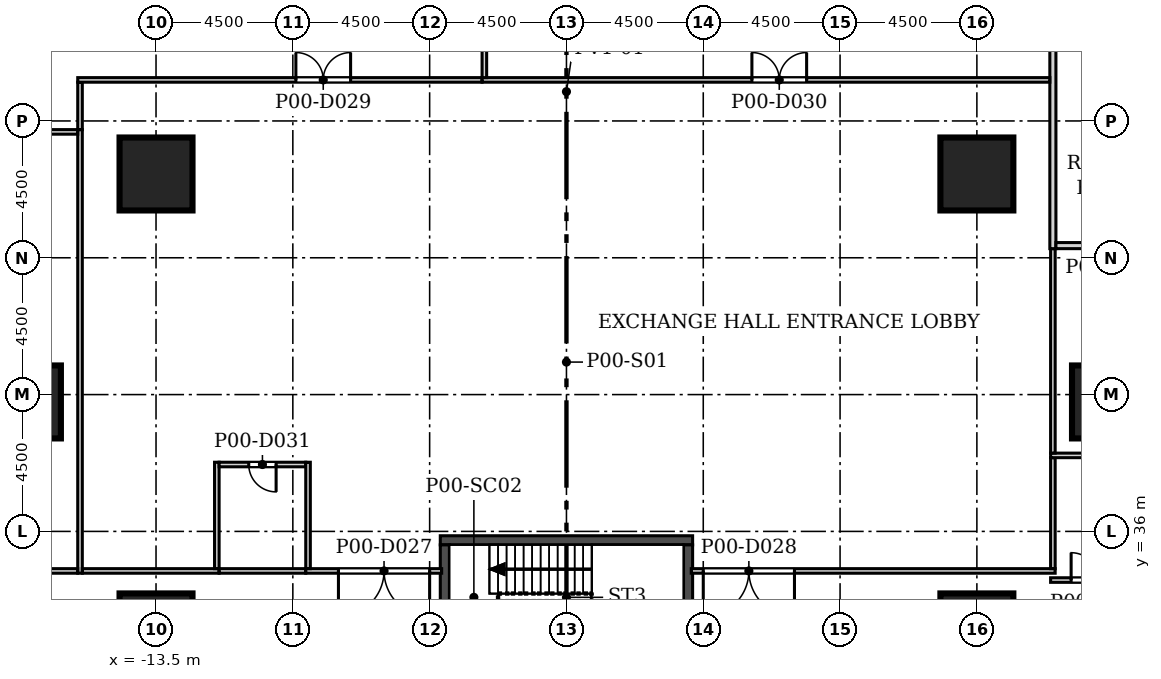
"""IFC4 building model, lengths in metres.
Left out: names, types, materials, properties, quantities, classifications, styles, units other than length and angle.
Written with IfcOpenShell. Run it as: python <this file> out.ifc"""

import sys

from ifc_helpers import new_model, si_unit, direction, frame, frame_2d, origin, origin_2d, place, context, subcontext, project, spatial, rectangle, extrude, element, fill, save


model = new_model("IFC4")
c1 = context("Model", 3, precision=1e-05, world=origin(), true_north=direction((0.0, 1.0)))
c2 = subcontext(c1, "Body", "Model", "MODEL_VIEW")
j1 = project(units=[si_unit("LENGTHUNIT", "METRE"), si_unit("PLANEANGLEUNIT", "RADIAN")], contexts=[c1])
p1 = place(None, origin())
s1 = spatial("IfcSite", under=j1, at=p1, CompositionType="ELEMENT")
p2 = place(p1, origin())
s2 = spatial("IfcBuilding", under=s1, at=p2, CompositionType="ELEMENT")
p3 = place(p2, origin())
s3 = spatial("IfcBuildingStorey", under=s2, at=p3, CompositionType="ELEMENT", Elevation=0.0)
for number, where, z_axis, x_axis in (
    (1, (-13.5, 47.756, 0.0), (0.0, 0.0, 1.0), (1.0, 0.0, 0.0)),
    (2, (-13.5, 32.76, 0.0), (0.0, 0.0, 1.0), (1.0, 0.0, 0.0)),
    (3, (13.5, 47.756, 0.0), (0.0, 0.0, 1.0), (1.0, 0.0, 0.0)),
    (4, (13.5, 32.76, 0.0), (0.0, 0.0, 1.0), (1.0, 0.0, 0.0)),
    (5, (17.829, 40.258, 0.0), (0.0, 0.0, 1.0), (1.0, 0.0, 0.0)),
    (6, (-17.829, 40.258, 0.0), (0.0, 0.0, 1.0), (1.0, 0.0, 0.0)),
):
    element("IfcColumn", number, at=place(p3, frame(where, z_axis=z_axis, x_axis=x_axis)), inside=s3, PredefinedType="COLUMN", context=c2, shape_type="SweptSolid", body=[
        extrude(rectangle(XDim=2.4, YDim=2.4, at=origin_2d()), origin(), (0.0, 0.0, 1.0), 8.0),
    ])
p4 = place(p3, frame((33.882, 24.114, 0.0), z_axis=(0.0, 0.0, 1.0), x_axis=(-0.500002868947, 0.866023747391, 0.0)))
e7 = element("IfcWall", 7, at=p4, inside=s3, PredefinedType="SOLIDWALL", context=c2, shape_type="SweptSolid", body=[
    extrude(rectangle(XDim=34.115, YDim=0.34, at=frame_2d((17.058, 0.0))), origin(), (0.0, 0.0, 1.0), 7.7),
])
p5 = place(p4, frame((1.115, 0.0, 0.9)))
e8 = element("IfcOpeningElement", 8, at=p5, cuts=e7, PredefinedType="OPENING", context=c2, shape_type="SweptSolid", body=[
    extrude(rectangle(XDim=1.885, YDim=3.5, at=frame_2d((0.942, 1.75))), frame((0.0, 0.18, 0.0), z_axis=(0.0, -1.0, 0.0), x_axis=(1.0, 0.0, 0.0)), (0.0, 0.0, 1.0), 0.36),
])
p6 = place(p4, frame((4.115, 0.0, 0.9)))
e9 = element("IfcOpeningElement", 9, at=p6, cuts=e7, PredefinedType="OPENING", context=c2, shape_type="SweptSolid", body=[
    extrude(rectangle(XDim=1.885, YDim=3.5, at=frame_2d((0.942, 1.75))), frame((0.0, 0.18, 0.0), z_axis=(0.0, -1.0, 0.0), x_axis=(1.0, 0.0, 0.0)), (0.0, 0.0, 1.0), 0.36),
])
p7 = place(p4, frame((22.115, 0.0, 0.9)))
e10 = element("IfcOpeningElement", 10, at=p7, cuts=e7, PredefinedType="OPENING", context=c2, shape_type="SweptSolid", body=[
    extrude(rectangle(XDim=1.885, YDim=3.5, at=frame_2d((0.942, 1.75))), frame((0.0, 0.18, 0.0), z_axis=(0.0, -1.0, 0.0), x_axis=(1.0, 0.0, 0.0)), (0.0, 0.0, 1.0), 0.36),
])
p8 = place(p4, frame((25.115, 0.0, 0.9)))
e11 = element("IfcOpeningElement", 11, at=p8, cuts=e7, PredefinedType="OPENING", context=c2, shape_type="SweptSolid", body=[
    extrude(rectangle(XDim=1.885, YDim=3.5, at=frame_2d((0.942, 1.75))), frame((0.0, 0.18, 0.0), z_axis=(0.0, -1.0, 0.0), x_axis=(1.0, 0.0, 0.0)), (0.0, 0.0, 1.0), 0.36),
])
p9 = place(p4, frame((7.378, 0.0, 0.0)))
e12 = element("IfcOpeningElement", 12, at=p9, cuts=e7, PredefinedType="OPENING", context=c2, shape_type="SweptSolid", body=[
    extrude(rectangle(XDim=2.4, YDim=2.7, at=frame_2d((1.2, 1.35))), frame((0.0, 0.18, 0.0), z_axis=(0.0, -1.0, 0.0), x_axis=(1.0, 0.0, 0.0)), (0.0, 0.0, 1.0), 0.36),
])
p10 = place(p4, frame((18.857, 0.0, 0.0)))
e13 = element("IfcOpeningElement", 13, at=p10, cuts=e7, PredefinedType="OPENING", context=c2, shape_type="SweptSolid", body=[
    extrude(rectangle(XDim=2.4, YDim=2.7, at=frame_2d((1.2, 1.35))), frame((0.0, 0.18, 0.0), z_axis=(0.0, -1.0, 0.0), x_axis=(1.0, 0.0, 0.0)), (0.0, 0.0, 1.0), 0.36),
])
p11 = place(p4, frame((30.336, 0.0, 0.0)))
e14 = element("IfcOpeningElement", 14, at=p11, cuts=e7, PredefinedType="OPENING", context=c2, shape_type="SweptSolid", body=[
    extrude(rectangle(XDim=2.4, YDim=2.7, at=frame_2d((1.2, 1.35))), frame((0.0, 0.18, 0.0), z_axis=(0.0, -1.0, 0.0), x_axis=(1.0, 0.0, 0.0)), (0.0, 0.0, 1.0), 0.36),
])
p12 = place(p4, frame((12.215, 0.0, 0.0)))
e15 = element("IfcOpeningElement", 15, at=p12, cuts=e7, PredefinedType="OPENING", context=c2, shape_type="SweptSolid", body=[
    extrude(rectangle(XDim=4.885, YDim=4.5, at=frame_2d((2.442, 2.25))), frame((0.0, 0.18, 0.0), z_axis=(0.0, -1.0, 0.0), x_axis=(1.0, 0.0, 0.0)), (0.0, 0.0, 1.0), 0.36),
])
p13 = place(p3, frame((-4.853, 74.393, 0.0), z_axis=(0.0, 0.0, 1.0), x_axis=(-0.499999725439, -0.866025562302, 0.0)))
e16 = element("IfcWall", 16, at=p13, inside=s3, PredefinedType="SOLIDWALL", context=c2, shape_type="SweptSolid", body=[
    extrude(rectangle(XDim=52.058, YDim=0.34, at=frame_2d((26.029, 0.0))), origin(), (0.0, 0.0, 1.0), 7.7),
])
p14 = place(p13, frame((19.058, 0.0, 0.9)))
e17 = element("IfcOpeningElement", 17, at=p14, cuts=e16, PredefinedType="OPENING", context=c2, shape_type="SweptSolid", body=[
    extrude(rectangle(XDim=1.885, YDim=3.5, at=frame_2d((0.942, 1.75))), frame((0.0, 0.18, 0.0), z_axis=(0.0, -1.0, 0.0), x_axis=(1.0, 0.0, 0.0)), (0.0, 0.0, 1.0), 0.36),
])
p15 = place(p13, frame((22.058, 0.0, 0.9)))
e18 = element("IfcOpeningElement", 18, at=p15, cuts=e16, PredefinedType="OPENING", context=c2, shape_type="SweptSolid", body=[
    extrude(rectangle(XDim=1.885, YDim=3.5, at=frame_2d((0.942, 1.75))), frame((0.0, 0.18, 0.0), z_axis=(0.0, -1.0, 0.0), x_axis=(1.0, 0.0, 0.0)), (0.0, 0.0, 1.0), 0.36),
])
p16 = place(p13, frame((40.058, 0.0, 0.9)))
e19 = element("IfcOpeningElement", 19, at=p16, cuts=e16, PredefinedType="OPENING", context=c2, shape_type="SweptSolid", body=[
    extrude(rectangle(XDim=1.885, YDim=3.5, at=frame_2d((0.942, 1.75))), frame((0.0, 0.18, 0.0), z_axis=(0.0, -1.0, 0.0), x_axis=(1.0, 0.0, 0.0)), (0.0, 0.0, 1.0), 0.36),
])
p17 = place(p13, frame((43.058, 0.0, 0.9)))
e20 = element("IfcOpeningElement", 20, at=p17, cuts=e16, PredefinedType="OPENING", context=c2, shape_type="SweptSolid", body=[
    extrude(rectangle(XDim=1.885, YDim=3.5, at=frame_2d((0.942, 1.75))), frame((0.0, 0.18, 0.0), z_axis=(0.0, -1.0, 0.0), x_axis=(1.0, 0.0, 0.0)), (0.0, 0.0, 1.0), 0.36),
])
p18 = place(p13, frame((48.279, 0.0, 0.0)))
e21 = element("IfcOpeningElement", 21, at=p18, cuts=e16, PredefinedType="OPENING", context=c2, shape_type="SweptSolid", body=[
    extrude(rectangle(XDim=2.4, YDim=2.7, at=frame_2d((1.2, 1.35))), frame((0.0, 0.18, 0.0), z_axis=(0.0, -1.0, 0.0), x_axis=(1.0, 0.0, 0.0)), (0.0, 0.0, 1.0), 0.36),
])
p19 = place(p13, frame((36.8, 0.0, 0.0)))
e22 = element("IfcOpeningElement", 22, at=p19, cuts=e16, PredefinedType="OPENING", context=c2, shape_type="SweptSolid", body=[
    extrude(rectangle(XDim=2.4, YDim=2.7, at=frame_2d((1.2, 1.35))), frame((0.0, 0.18, 0.0), z_axis=(0.0, -1.0, 0.0), x_axis=(1.0, 0.0, 0.0)), (0.0, 0.0, 1.0), 0.36),
])
p20 = place(p13, frame((31.06, 0.0, 0.0)))
e23 = element("IfcOpeningElement", 23, at=p20, cuts=e16, PredefinedType="OPENING", context=c2, shape_type="SweptSolid", body=[
    extrude(rectangle(XDim=2.4, YDim=2.7, at=frame_2d((1.2, 1.35))), frame((0.0, 0.18, 0.0), z_axis=(0.0, -1.0, 0.0), x_axis=(1.0, 0.0, 0.0)), (0.0, 0.0, 1.0), 0.36),
])
p21 = place(p13, frame((25.321, 0.0, 0.0)))
e24 = element("IfcOpeningElement", 24, at=p21, cuts=e16, PredefinedType="OPENING", context=c2, shape_type="SweptSolid", body=[
    extrude(rectangle(XDim=2.4, YDim=2.7, at=frame_2d((1.2, 1.35))), frame((0.0, 0.18, 0.0), z_axis=(0.0, -1.0, 0.0), x_axis=(1.0, 0.0, 0.0)), (0.0, 0.0, 1.0), 0.36),
])
p22 = place(p13, frame((13.842, 0.0, 0.0)))
e25 = element("IfcOpeningElement", 25, at=p22, cuts=e16, PredefinedType="OPENING", context=c2, shape_type="SweptSolid", body=[
    extrude(rectangle(XDim=2.4, YDim=2.7, at=frame_2d((1.2, 1.35))), frame((0.0, 0.18, 0.0), z_axis=(0.0, -1.0, 0.0), x_axis=(1.0, 0.0, 0.0)), (0.0, 0.0, 1.0), 0.36),
])
p23 = place(p13, frame((8.102, 0.0, 0.0)))
e26 = element("IfcOpeningElement", 26, at=p23, cuts=e16, PredefinedType="OPENING", context=c2, shape_type="SweptSolid", body=[
    extrude(rectangle(XDim=2.4, YDim=2.7, at=frame_2d((1.2, 1.35))), frame((0.0, 0.18, 0.0), z_axis=(0.0, -1.0, 0.0), x_axis=(1.0, 0.0, 0.0)), (0.0, 0.0, 1.0), 0.36),
])
p24 = place(p13, frame((2.363, 0.0, 0.0)))
e27 = element("IfcOpeningElement", 27, at=p24, cuts=e16, PredefinedType="OPENING", context=c2, shape_type="SweptSolid", body=[
    extrude(rectangle(XDim=2.4, YDim=2.7, at=frame_2d((1.2, 1.35))), frame((0.0, 0.18, 0.0), z_axis=(0.0, -1.0, 0.0), x_axis=(1.0, 0.0, 0.0)), (0.0, 0.0, 1.0), 0.36),
])
p25 = place(p3, frame((-4.15, 35.707, -0.4), z_axis=(0.0, 0.0, 1.0), x_axis=(1.0, 0.0, 0.0)))
e28 = element("IfcWall", 28, at=p25, inside=s3, PredefinedType="SOLIDWALL", context=c2, shape_type="SweptSolid", body=[
    extrude(rectangle(XDim=8.3, YDim=0.3, at=frame_2d((4.15, 0.0))), origin(), (0.0, 0.0, 1.0), 8.1),
])
for number, where, z_axis, x_axis in (
    (29, (-4.0, 29.057, -0.4), (0.0, 0.0, 1.0), (0.0, 1.0, 0.0)),
    (30, (4.0, 29.057, -0.4), (0.0, 0.0, 1.0), (0.0, 1.0, 0.0)),
):
    element("IfcWall", number, at=place(p3, frame(where, z_axis=z_axis, x_axis=x_axis)), inside=s3, PredefinedType="SOLIDWALL", context=c2, shape_type="SweptSolid", body=[
        extrude(rectangle(XDim=6.5, YDim=0.3, at=frame_2d((3.25, 0.0))), origin(), (0.0, 0.0, 1.0), 8.1),
    ])
p26 = place(p3, frame((26.075, 34.4, 0.0), z_axis=(0.0, 0.0, 1.0), x_axis=(-1.0, 0.0, 0.0)))
e31 = element("IfcWall", 31, at=p26, inside=s3, PredefinedType="PARTITIONING", context=c2, shape_type="SweptSolid", body=[
    extrude(rectangle(XDim=10.15, YDim=0.15, at=frame_2d((5.075, 0.0))), origin(), (0.0, 0.0, 1.0), 7.7),
])
p27 = place(p26, frame((7.675, 0.0, 0.0)))
e32 = element("IfcOpeningElement", 32, at=p27, cuts=e31, PredefinedType="OPENING", context=c2, shape_type="SweptSolid", body=[
    extrude(rectangle(XDim=1.8, YDim=2.1, at=frame_2d((0.9, 1.05))), frame((0.0, 0.085, 0.0), z_axis=(0.0, -1.0, 0.0), x_axis=(1.0, 0.0, 0.0)), (0.0, 0.0, 1.0), 0.17),
])
p28 = place(p3, frame((-16.0, 34.625, 0.0), z_axis=(0.0, 0.0, 1.0), x_axis=(0.0, 1.0, 0.0)))
e33 = element("IfcWall", 33, at=p28, inside=s3, PredefinedType="PARTITIONING", context=c2, shape_type="SweptSolid", body=[
    extrude(rectangle(XDim=14.59, YDim=0.15, at=frame_2d((7.295, 0.0))), origin(), (0.0, 0.0, 1.0), 7.7),
])
p29 = place(p3, frame((-16.075, 34.7, 0.0), z_axis=(0.0, 0.0, 1.0), x_axis=(-1.0, 0.0, 0.0)))
e34 = element("IfcWall", 34, at=p29, inside=s3, PredefinedType="PARTITIONING", context=c2, shape_type="SweptSolid", body=[
    extrude(rectangle(XDim=10.1, YDim=0.15, at=frame_2d((5.05, 0.0))), origin(), (0.0, 0.0, 1.0), 7.7),
])
p30 = place(p29, frame((3.025, 0.0, 0.0)))
e35 = element("IfcOpeningElement", 35, at=p30, cuts=e34, PredefinedType="OPENING", context=c2, shape_type="SweptSolid", body=[
    extrude(rectangle(XDim=1.8, YDim=2.1, at=frame_2d((0.9, 1.05))), frame((0.0, 0.085, 0.0), z_axis=(0.0, -1.0, 0.0), x_axis=(1.0, 0.0, 0.0)), (0.0, 0.0, 1.0), 0.17),
])
p31 = place(p3, frame((-11.425, 34.7, 0.0), z_axis=(0.0, 0.0, 1.0), x_axis=(-1.0, 0.0, 0.0)))
e36 = element("IfcWall", 36, at=p31, inside=s3, PredefinedType="PARTITIONING", context=c2, shape_type="SweptSolid", body=[
    extrude(rectangle(XDim=4.5, YDim=0.15, at=frame_2d((2.25, 0.0))), origin(), (0.0, 0.0, 1.0), 7.7),
])
p32 = place(p3, frame((-8.575, 34.7, 0.0), z_axis=(0.0, 0.0, 1.0), x_axis=(-1.0, 0.0, 0.0)))
e37 = element("IfcWall", 37, at=p32, inside=s3, PredefinedType="PARTITIONING", context=c2, shape_type="SweptSolid", body=[
    extrude(rectangle(XDim=2.85, YDim=0.15, at=frame_2d((1.425, 0.0))), origin(), (0.0, 0.0, 1.0), 7.7),
])
p33 = place(p3, frame((-4.105, 34.7, 0.0), z_axis=(0.0, 0.0, 1.0), x_axis=(-1.0, 0.0, 0.0)))
e38 = element("IfcWall", 38, at=p33, inside=s3, PredefinedType="PARTITIONING", context=c2, shape_type="SweptSolid", body=[
    extrude(rectangle(XDim=4.47, YDim=0.15, at=frame_2d((2.235, 0.0))), origin(), (0.0, 0.0, 1.0), 7.7),
])
p34 = place(p33, frame((0.395, 0.0, 0.0)))
e39 = element("IfcOpeningElement", 39, at=p34, cuts=e38, PredefinedType="OPENING", context=c2, shape_type="SweptSolid", body=[
    extrude(rectangle(XDim=3.0, YDim=2.4, at=frame_2d((1.5, 1.2))), frame((0.0, 0.085, 0.0), z_axis=(0.0, -1.0, 0.0), x_axis=(1.0, 0.0, 0.0)), (0.0, 0.0, 1.0), 0.17),
])
p35 = place(p3, frame((16.075, 34.7, 0.0), z_axis=(0.0, 0.0, 1.0), x_axis=(-1.0, 0.0, 0.0)))
e40 = element("IfcWall", 40, at=p35, inside=s3, PredefinedType="PARTITIONING", context=c2, shape_type="SweptSolid", body=[
    extrude(rectangle(XDim=11.97, YDim=0.15, at=frame_2d((5.985, 0.0))), origin(), (0.0, 0.0, 1.0), 7.7),
])
p36 = place(p35, frame((8.575, 0.0, 0.0)))
e41 = element("IfcOpeningElement", 41, at=p36, cuts=e40, PredefinedType="OPENING", context=c2, shape_type="SweptSolid", body=[
    extrude(rectangle(XDim=3.0, YDim=2.4, at=frame_2d((1.5, 1.2))), frame((0.0, 0.085, 0.0), z_axis=(0.0, -1.0, 0.0), x_axis=(1.0, 0.0, 0.0)), (0.0, 0.0, 1.0), 0.17),
])
p37 = place(p3, frame((-11.5, 34.775, 0.0), z_axis=(0.0, 0.0, 1.0), x_axis=(0.0, 1.0, 0.0)))
e42 = element("IfcWall", 42, at=p37, inside=s3, PredefinedType="PARTITIONING", context=c2, shape_type="SweptSolid", body=[
    extrude(rectangle(XDim=3.5, YDim=0.15, at=frame_2d((1.75, 0.0))), origin(), (0.0, 0.0, 1.0), 7.7),
])
p38 = place(p3, frame((16.0, 34.775, 0.0), z_axis=(0.0, 0.0, 1.0), x_axis=(0.0, 1.0, 0.0)))
e43 = element("IfcWall", 43, at=p38, inside=s3, PredefinedType="PARTITIONING", context=c2, shape_type="SweptSolid", body=[
    extrude(rectangle(XDim=3.65, YDim=0.15, at=frame_2d((1.825, 0.0))), origin(), (0.0, 0.0, 1.0), 7.7),
])
p39 = place(p3, frame((-11.425, 38.2, 0.0), z_axis=(0.0, 0.0, 1.0), x_axis=(1.0, 0.0, 0.0)))
e44 = element("IfcWall", 44, at=p39, inside=s3, PredefinedType="PARTITIONING", context=c2, shape_type="SweptSolid", body=[
    extrude(rectangle(XDim=2.85, YDim=0.15, at=frame_2d((1.425, 0.0))), origin(), (0.0, 0.0, 1.0), 7.7),
])
p40 = place(p39, frame((0.975, 0.0, 0.0)))
e45 = element("IfcOpeningElement", 45, at=p40, cuts=e44, PredefinedType="OPENING", context=c2, shape_type="SweptSolid", body=[
    extrude(rectangle(XDim=0.9, YDim=2.1, at=frame_2d((0.45, 1.05))), frame((0.0, 0.085, 0.0), z_axis=(0.0, -1.0, 0.0), x_axis=(1.0, 0.0, 0.0)), (0.0, 0.0, 1.0), 0.17),
])
p41 = place(p3, frame((-8.5, 38.275, 0.0), z_axis=(0.0, 0.0, 1.0), x_axis=(0.0, -1.0, 0.0)))
e46 = element("IfcWall", 46, at=p41, inside=s3, PredefinedType="PARTITIONING", context=c2, shape_type="SweptSolid", body=[
    extrude(rectangle(XDim=3.5, YDim=0.15, at=frame_2d((1.75, 0.0))), origin(), (0.0, 0.0, 1.0), 7.7),
])
p42 = place(p3, frame((15.925, 38.5, 0.0), z_axis=(0.0, 0.0, 1.0), x_axis=(1.0, 0.0, 0.0)))
e47 = element("IfcWall", 47, at=p42, inside=s3, PredefinedType="PARTITIONING", context=c2, shape_type="SweptSolid", body=[
    extrude(rectangle(XDim=8.035, YDim=0.15, at=frame_2d((4.018, 0.0))), origin(), (0.0, 0.0, 1.0), 7.7),
])
p43 = place(p42, frame((5.275, 0.0, 0.0)))
e48 = element("IfcOpeningElement", 48, at=p43, cuts=e47, PredefinedType="OPENING", context=c2, shape_type="SweptSolid", body=[
    extrude(rectangle(XDim=1.8, YDim=2.1, at=frame_2d((0.9, 1.05))), frame((0.0, 0.085, 0.0), z_axis=(0.0, -1.0, 0.0), x_axis=(1.0, 0.0, 0.0)), (0.0, 0.0, 1.0), 0.17),
])
p44 = place(p3, frame((16.0, 38.575, 0.0), z_axis=(0.0, 0.0, 1.0), x_axis=(0.0, 1.0, 0.0)))
e49 = element("IfcWall", 49, at=p44, inside=s3, PredefinedType="PARTITIONING", context=c2, shape_type="SweptSolid", body=[
    extrude(rectangle(XDim=6.725, YDim=0.15, at=frame_2d((3.363, 0.0))), origin(), (0.0, 0.0, 1.0), 7.7),
])
p45 = place(p3, frame((16.0, 45.3, 0.0), z_axis=(0.0, 0.0, 1.0), x_axis=(0.0, 1.0, 0.0)))
e50 = element("IfcWall", 50, at=p45, inside=s3, PredefinedType="PARTITIONING", context=c2, shape_type="SweptSolid", body=[
    extrude(rectangle(XDim=9.635, YDim=0.2, at=frame_2d((4.818, 0.0))), origin(), (0.0, 0.0, 1.0), 7.7),
])
p46 = place(p3, frame((21.461, 45.4, 0.0), z_axis=(0.0, 0.0, 1.0), x_axis=(-1.0, 0.0, 0.0)))
e51 = element("IfcWall", 51, at=p46, inside=s3, PredefinedType="PARTITIONING", context=c2, shape_type="SweptSolid", body=[
    extrude(rectangle(XDim=5.361, YDim=0.2, at=frame_2d((2.681, 0.0))), origin(), (0.0, 0.0, 1.0), 7.7),
])
p47 = place(p46, frame((3.011, 0.0, 0.0)))
e52 = element("IfcOpeningElement", 52, at=p47, cuts=e51, PredefinedType="OPENING", context=c2, shape_type="SweptSolid", body=[
    extrude(rectangle(XDim=0.9, YDim=2.1, at=frame_2d((0.45, 1.05))), frame((0.0, 0.11, 0.0), z_axis=(0.0, -1.0, 0.0), x_axis=(1.0, 0.0, 0.0)), (0.0, 0.0, 1.0), 0.22),
])
p48 = place(p3, frame((-16.075, 49.14, 0.0), z_axis=(0.0, 0.0, 1.0), x_axis=(-1.0, 0.0, 0.0)))
e53 = element("IfcWall", 53, at=p48, inside=s3, PredefinedType="PARTITIONING", context=c2, shape_type="SweptSolid", body=[
    extrude(rectangle(XDim=1.265, YDim=0.15, at=frame_2d((0.633, 0.0))), origin(), (0.0, 0.0, 1.0), 7.7),
])
p49 = place(p3, frame((-16.0, 49.215, 0.0), z_axis=(0.0, 0.0, 1.0), x_axis=(0.0, 1.0, 0.0)))
e54 = element("IfcWall", 54, at=p49, inside=s3, PredefinedType="PARTITIONING", context=c2, shape_type="SweptSolid", body=[
    extrude(rectangle(XDim=1.56, YDim=0.15, at=frame_2d((0.78, 0.0))), origin(), (0.0, 0.0, 1.0), 7.7),
])
p50 = place(p3, frame((-16.075, 50.85, 0.0), z_axis=(0.0, 0.0, 1.0), x_axis=(1.0, 0.0, 0.0)))
e55 = element("IfcWall", 55, at=p50, inside=s3, PredefinedType="PARTITIONING", context=c2, shape_type="SweptSolid", body=[
    extrude(rectangle(XDim=13.3, YDim=0.15, at=frame_2d((6.65, 0.0))), origin(), (0.0, 0.0, 1.0), 7.7),
])
p51 = place(p50, frame((7.175, 0.0, 0.0)))
e56 = element("IfcOpeningElement", 56, at=p51, cuts=e55, PredefinedType="OPENING", context=c2, shape_type="SweptSolid", body=[
    extrude(rectangle(XDim=1.8, YDim=2.1, at=frame_2d((0.9, 1.05))), frame((0.0, 0.085, 0.0), z_axis=(0.0, -1.0, 0.0), x_axis=(1.0, 0.0, 0.0)), (0.0, 0.0, 1.0), 0.17),
])
p52 = place(p3, frame((-2.775, 50.85, 0.0), z_axis=(0.0, 0.0, 1.0), x_axis=(1.0, 0.0, 0.0)))
e57 = element("IfcWall", 57, at=p52, inside=s3, PredefinedType="PARTITIONING", context=c2, shape_type="SweptSolid", body=[
    extrude(rectangle(XDim=18.675, YDim=0.15, at=frame_2d((9.337, 0.0))), origin(), (0.0, 0.0, 1.0), 7.7),
])
p53 = place(p52, frame((8.875, 0.0, 0.0)))
e58 = element("IfcOpeningElement", 58, at=p53, cuts=e57, PredefinedType="OPENING", context=c2, shape_type="SweptSolid", body=[
    extrude(rectangle(XDim=1.8, YDim=2.1, at=frame_2d((0.9, 1.05))), frame((0.0, 0.085, 0.0), z_axis=(0.0, -1.0, 0.0), x_axis=(1.0, 0.0, 0.0)), (0.0, 0.0, 1.0), 0.17),
])
p54 = place(p3, frame((-2.7, 62.475, 0.0), z_axis=(0.0, 0.0, 1.0), x_axis=(0.0, -1.0, 0.0)))
e59 = element("IfcWall", 59, at=p54, inside=s3, PredefinedType="PARTITIONING", context=c2, shape_type="SweptSolid", body=[
    extrude(rectangle(XDim=11.55, YDim=0.15, at=frame_2d((5.775, 0.0))), origin(), (0.0, 0.0, 1.0), 7.7),
])
p55 = place(p34, origin())
e60 = element("IfcDoor", 60, at=p55, inside=s3, OperationType="DOUBLE_DOOR_SINGLE_SWING", PredefinedType="DOOR", context=c2, shape_type="SweptSolid", body=[
    extrude(rectangle(XDim=3.0, YDim=2.4, at=frame_2d((1.5, 1.2))), frame((0.0, 0.025, 0.0), z_axis=(0.0, -1.0, 0.0), x_axis=(1.0, 0.0, 0.0)), (0.0, 0.0, 1.0), 0.05),
])
fill(e39, e60)
p56 = place(p36, origin())
e61 = element("IfcDoor", 61, at=p56, inside=s3, OperationType="DOUBLE_DOOR_SINGLE_SWING", PredefinedType="DOOR", context=c2, shape_type="SweptSolid", body=[
    extrude(rectangle(XDim=3.0, YDim=2.4, at=frame_2d((1.5, 1.2))), frame((0.0, 0.025, 0.0), z_axis=(0.0, -1.0, 0.0), x_axis=(1.0, 0.0, 0.0)), (0.0, 0.0, 1.0), 0.05),
])
fill(e41, e61)
p57 = place(p51, origin())
e62 = element("IfcDoor", 62, at=p57, inside=s3, OperationType="DOUBLE_DOOR_SINGLE_SWING", PredefinedType="DOOR", context=c2, shape_type="SweptSolid", body=[
    extrude(rectangle(XDim=1.8, YDim=2.1, at=frame_2d((0.9, 1.05))), frame((0.0, 0.025, 0.0), z_axis=(0.0, -1.0, 0.0), x_axis=(1.0, 0.0, 0.0)), (0.0, 0.0, 1.0), 0.05),
])
fill(e56, e62)
p58 = place(p53, origin())
e63 = element("IfcDoor", 63, at=p58, inside=s3, OperationType="DOUBLE_DOOR_SINGLE_SWING", PredefinedType="DOOR", context=c2, shape_type="SweptSolid", body=[
    extrude(rectangle(XDim=1.8, YDim=2.1, at=frame_2d((0.9, 1.05))), frame((0.0, 0.025, 0.0), z_axis=(0.0, -1.0, 0.0), x_axis=(1.0, 0.0, 0.0)), (0.0, 0.0, 1.0), 0.05),
])
fill(e58, e63)
p59 = place(p40, frame((0.9, 0.0, 0.0), z_axis=(0.0, 0.0, 1.0), x_axis=(-1.0, 0.0, 0.0)))
e64 = element("IfcDoor", 64, at=p59, inside=s3, OperationType="SINGLE_SWING_LEFT", PredefinedType="DOOR", context=c2, shape_type="SweptSolid", body=[
    extrude(rectangle(XDim=0.9, YDim=2.1, at=frame_2d((0.45, 1.05))), frame((0.0, 0.025, 0.0), z_axis=(0.0, -1.0, 0.0), x_axis=(1.0, 0.0, 0.0)), (0.0, 0.0, 1.0), 0.05),
])
fill(e45, e64)
p60 = place(p27, frame((1.8, 0.0, 0.0), z_axis=(0.0, 0.0, 1.0), x_axis=(-1.0, 0.0, 0.0)))
e65 = element("IfcDoor", 65, at=p60, inside=s3, OperationType="DOUBLE_DOOR_SINGLE_SWING", PredefinedType="DOOR", context=c2, shape_type="SweptSolid", body=[
    extrude(rectangle(XDim=1.8, YDim=2.1, at=frame_2d((0.9, 1.05))), frame((0.0, 0.025, 0.0), z_axis=(0.0, -1.0, 0.0), x_axis=(1.0, 0.0, 0.0)), (0.0, 0.0, 1.0), 0.05),
])
fill(e32, e65)
save(model, sys.argv[1])
